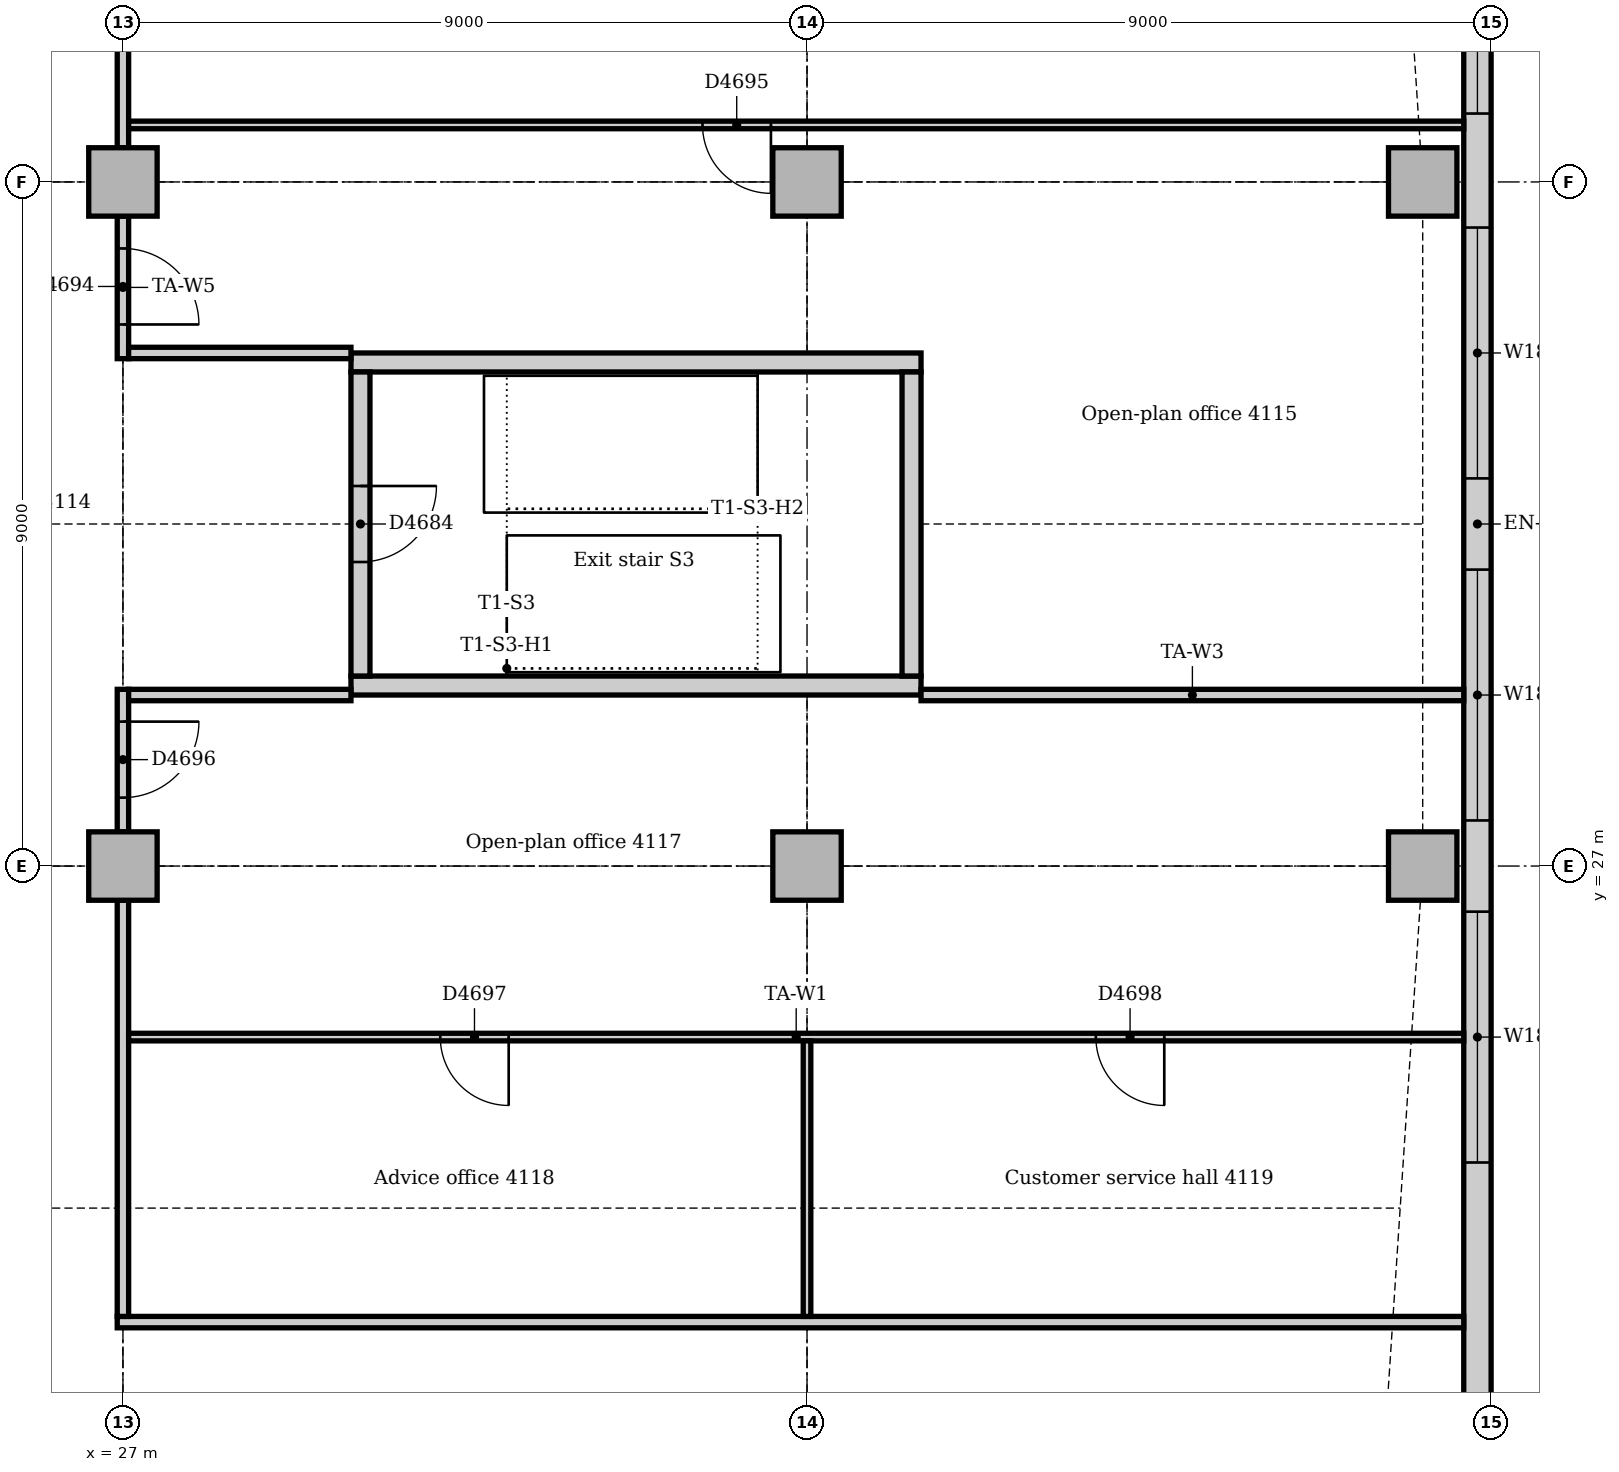
"""IFC4 building model, lengths in metres.
Left out: names, types, materials, properties, quantities, classifications, styles, units other than length and angle.
Written with IfcOpenShell. Run it as: python <this file> out.ifc"""

import sys

from ifc_helpers import new_model, si_unit, direction, frame, frame_2d, origin, origin_2d, place, context, subcontext, project, spatial, rectangle, extrude, element, fill, save


model = new_model("IFC4")
c1 = context("Model", 3, precision=1e-05, world=origin(), true_north=direction((0.0, 1.0)))
c2 = subcontext(c1, "Body", "Model", "MODEL_VIEW")
j1 = project(units=[si_unit("LENGTHUNIT", "METRE"), si_unit("PLANEANGLEUNIT", "RADIAN")], contexts=[c1])
p1 = place(None, origin())
s1 = spatial("IfcSite", under=j1, at=p1, CompositionType="ELEMENT")
p2 = place(p1, origin())
s2 = spatial("IfcBuilding", under=s1, at=p2, CompositionType="ELEMENT")
p3 = place(p2, frame((0.0, 0.0, 173.0)))
s3 = spatial("IfcBuildingStorey", under=s2, at=p3, CompositionType="ELEMENT", Elevation=173.0)
for number, where, z_axis, x_axis in (
    (1, (30.0, 29.375, 0.0), (0.0, 0.0, 1.0), (1.0, 0.0, 0.0)),
    (2, (37.5, 33.625, 0.0), (0.0, 0.0, 1.0), (-1.0, 0.0, 0.0)),
):
    element("IfcWall", number, at=place(p3, frame(where, z_axis=z_axis, x_axis=x_axis)), inside=s3, PredefinedType="SOLIDWALL", context=c2, shape_type="SweptSolid", body=[
        extrude(rectangle(XDim=7.5, YDim=0.25, at=frame_2d((3.75, 0.0))), origin(), (0.0, 0.0, 1.0), 4.0),
    ])
p4 = place(p3, frame((37.375, 29.5, 0.0), z_axis=(0.0, 0.0, 1.0), x_axis=(0.0, 1.0, 0.0)))
e3 = element("IfcWall", 3, at=p4, inside=s3, PredefinedType="SOLIDWALL", context=c2, shape_type="SweptSolid", body=[
    extrude(rectangle(XDim=4.0, YDim=0.25, at=frame_2d((2.0, 0.0))), origin(), (0.0, 0.0, 1.0), 4.0),
])
p5 = place(p3, frame((30.125, 33.5, 0.0), z_axis=(0.0, 0.0, 1.0), x_axis=(0.0, -1.0, 0.0)))
e4 = element("IfcWall", 4, at=p5, inside=s3, PredefinedType="SOLIDWALL", context=c2, shape_type="SweptSolid", body=[
    extrude(rectangle(XDim=4.0, YDim=0.25, at=frame_2d((2.0, 0.0))), origin(), (0.0, 0.0, 1.0), 4.0),
])
p6 = place(p5, frame((1.5, 0.0, 0.0)))
e5 = element("IfcOpeningElement", 5, at=p6, cuts=e4, PredefinedType="OPENING", context=c2, shape_type="SweptSolid", body=[
    extrude(rectangle(XDim=1.0, YDim=2.1, at=frame_2d((0.5, 1.05))), frame((0.0, 0.135, 0.0), z_axis=(0.0, -1.0, 0.0), x_axis=(1.0, 0.0, 0.0)), (0.0, 0.0, 1.0), 0.27),
])
for number, where, z_axis, x_axis in (
    (6, (44.1, 27.0, 0.0), (0.0, 0.0, 1.0), (1.0, 0.0, 0.0)),
    (7, (44.1, 36.0, 0.0), (0.0, 0.0, 1.0), (1.0, 0.0, 0.0)),
    (8, (27.0, 27.0, 0.0), (0.0, 0.0, 1.0), (1.0, 0.0, 0.0)),
    (9, (27.0, 36.0, 0.0), (0.0, 0.0, 1.0), (1.0, 0.0, 0.0)),
    (10, (36.0, 27.0, 0.0), (0.0, 0.0, 1.0), (1.0, 0.0, 0.0)),
    (11, (36.0, 36.0, 0.0), (0.0, 0.0, 1.0), (1.0, 0.0, 0.0)),
):
    element("IfcColumn", number, at=place(p3, frame(where, z_axis=z_axis, x_axis=x_axis)), inside=s3, PredefinedType="COLUMN", context=c2, shape_type="SweptSolid", body=[
        extrude(rectangle(XDim=0.9, YDim=0.9, at=origin_2d()), origin(), (0.0, 0.0, 1.0), 3.85),
    ])
p7 = place(p3, frame((44.82, 19.243, 0.0), z_axis=(0.0, 0.0, 1.0), x_axis=(0.0, 1.0, 0.0)))
e12 = element("IfcWall", 12, at=p7, inside=s3, PredefinedType="STANDARD", context=c2, shape_type="SweptSolid", body=[
    extrude(rectangle(XDim=24.515, YDim=0.36, at=frame_2d((12.257, 0.0))), origin(), (0.0, 0.0, 1.0), 3.85),
])
p8 = place(p7, frame((3.857, 0.0, 0.9)))
e13 = element("IfcOpeningElement", 13, at=p8, cuts=e12, PredefinedType="OPENING", context=c2, shape_type="SweptSolid", body=[
    extrude(rectangle(XDim=3.3, YDim=1.6, at=frame_2d((1.65, 0.8))), frame((0.0, 0.19, 0.0), z_axis=(0.0, -1.0, 0.0), x_axis=(1.0, 0.0, 0.0)), (0.0, 0.0, 1.0), 0.38),
])
p9 = place(p7, frame((8.357, 0.0, 0.9)))
e14 = element("IfcOpeningElement", 14, at=p9, cuts=e12, PredefinedType="OPENING", context=c2, shape_type="SweptSolid", body=[
    extrude(rectangle(XDim=3.3, YDim=1.6, at=frame_2d((1.65, 0.8))), frame((0.0, 0.19, 0.0), z_axis=(0.0, -1.0, 0.0), x_axis=(1.0, 0.0, 0.0)), (0.0, 0.0, 1.0), 0.38),
])
p10 = place(p7, frame((12.857, 0.0, 0.9)))
e15 = element("IfcOpeningElement", 15, at=p10, cuts=e12, PredefinedType="OPENING", context=c2, shape_type="SweptSolid", body=[
    extrude(rectangle(XDim=3.3, YDim=1.6, at=frame_2d((1.65, 0.8))), frame((0.0, 0.19, 0.0), z_axis=(0.0, -1.0, 0.0), x_axis=(1.0, 0.0, 0.0)), (0.0, 0.0, 1.0), 0.38),
])
p11 = place(p7, frame((17.657, 0.0, 0.9)))
e16 = element("IfcOpeningElement", 16, at=p11, cuts=e12, PredefinedType="OPENING", context=c2, shape_type="SweptSolid", body=[
    extrude(rectangle(XDim=3.3, YDim=1.6, at=frame_2d((1.65, 0.8))), frame((0.0, 0.19, 0.0), z_axis=(0.0, -1.0, 0.0), x_axis=(1.0, 0.0, 0.0)), (0.0, 0.0, 1.0), 0.38),
])
p12 = place(p3, frame((26.925, 21.0, 0.0), z_axis=(0.0, 0.0, 1.0), x_axis=(1.0, 0.0, 0.0)))
e17 = element("IfcWall", 17, at=p12, inside=s3, PredefinedType="PARTITIONING", context=c2, shape_type="SweptSolid", body=[
    extrude(rectangle(XDim=17.715, YDim=0.15, at=frame_2d((8.857, 0.0))), origin(), (0.0, 0.0, 1.0), 3.85),
])
p13 = place(p3, frame((27.0, 33.675, 0.0), z_axis=(0.0, 0.0, 1.0), x_axis=(0.0, 1.0, 0.0)))
e18 = element("IfcWall", 18, at=p13, inside=s3, PredefinedType="PARTITIONING", context=c2, shape_type="SweptSolid", body=[
    extrude(rectangle(XDim=1.875, YDim=0.15, at=frame_2d((0.938, 0.0))), origin(), (0.0, 0.0, 1.0), 3.362),
])
p14 = place(p13, frame((0.45, 0.0, 0.0)))
e19 = element("IfcOpeningElement", 19, at=p14, cuts=e18, PredefinedType="OPENING", context=c2, shape_type="SweptSolid", body=[
    extrude(rectangle(XDim=1.0, YDim=2.1, at=frame_2d((0.5, 1.05))), frame((0.0, 0.085, 0.0), z_axis=(0.0, -1.0, 0.0), x_axis=(1.0, 0.0, 0.0)), (0.0, 0.0, 1.0), 0.17),
])
p15 = place(p3, frame((27.0, 36.45, 0.0), z_axis=(0.0, 0.0, 1.0), x_axis=(0.0, 1.0, 0.0)))
e20 = element("IfcWall", 20, at=p15, inside=s3, PredefinedType="PARTITIONING", context=c2, shape_type="SweptSolid", body=[
    extrude(rectangle(XDim=7.2, YDim=0.15, at=frame_2d((3.6, 0.0))), origin(), (0.0, 0.0, 1.0), 3.362),
])
p16 = place(p3, frame((27.0, 21.075, 0.0), z_axis=(0.0, 0.0, 1.0), x_axis=(0.0, 1.0, 0.0)))
e21 = element("IfcWall", 21, at=p16, inside=s3, PredefinedType="PARTITIONING", context=c2, shape_type="SweptSolid", body=[
    extrude(rectangle(XDim=5.475, YDim=0.15, at=frame_2d((2.737, 0.0))), origin(), (0.0, 0.0, 1.0), 3.362),
])
p17 = place(p3, frame((27.0, 27.45, 0.0), z_axis=(0.0, 0.0, 1.0), x_axis=(0.0, 1.0, 0.0)))
e22 = element("IfcWall", 22, at=p17, inside=s3, PredefinedType="PARTITIONING", context=c2, shape_type="SweptSolid", body=[
    extrude(rectangle(XDim=1.875, YDim=0.15, at=frame_2d((0.938, 0.0))), origin(), (0.0, 0.0, 1.0), 3.362),
])
p18 = place(p17, frame((0.45, 0.0, 0.0)))
e23 = element("IfcOpeningElement", 23, at=p18, cuts=e22, PredefinedType="OPENING", context=c2, shape_type="SweptSolid", body=[
    extrude(rectangle(XDim=1.0, YDim=2.1, at=frame_2d((0.5, 1.05))), frame((0.0, 0.085, 0.0), z_axis=(0.0, -1.0, 0.0), x_axis=(1.0, 0.0, 0.0)), (0.0, 0.0, 1.0), 0.17),
])
for number, where, z_axis, x_axis in (
    (24, (27.075, 29.25, 0.0), (0.0, 0.0, 1.0), (1.0, 0.0, 0.0)),
    (25, (27.075, 33.75, 0.0), (0.0, 0.0, 1.0), (1.0, 0.0, 0.0)),
):
    element("IfcWall", number, at=place(p3, frame(where, z_axis=z_axis, x_axis=x_axis)), inside=s3, PredefinedType="PARTITIONING", context=c2, shape_type="SweptSolid", body=[
        extrude(rectangle(XDim=2.925, YDim=0.15, at=frame_2d((1.462, 0.0))), origin(), (0.0, 0.0, 1.0), 3.85),
    ])
p19 = place(p3, frame((37.5, 29.25, 0.0), z_axis=(0.0, 0.0, 1.0), x_axis=(1.0, 0.0, 0.0)))
e26 = element("IfcWall", 26, at=p19, inside=s3, PredefinedType="PARTITIONING", context=c2, shape_type="SweptSolid", body=[
    extrude(rectangle(XDim=7.14, YDim=0.15, at=frame_2d((3.57, 0.0))), origin(), (0.0, 0.0, 1.0), 3.85),
])
p20 = place(p3, frame((27.075, 24.75, 0.0), z_axis=(0.0, 0.0, 1.0), x_axis=(1.0, 0.0, 0.0)))
e27 = element("IfcWall", 27, at=p20, inside=s3, PredefinedType="PARTITIONING", context=c2, shape_type="SweptSolid", body=[
    extrude(rectangle(XDim=17.565, YDim=0.1, at=frame_2d((8.783, 0.0))), origin(), (0.0, 0.0, 1.0), 3.85),
])
p21 = place(p20, frame((4.1, 0.0, 0.0)))
e28 = element("IfcOpeningElement", 28, at=p21, cuts=e27, PredefinedType="OPENING", context=c2, shape_type="SweptSolid", body=[
    extrude(rectangle(XDim=0.9, YDim=2.1, at=frame_2d((0.45, 1.05))), frame((0.0, 0.06, 0.0), z_axis=(0.0, -1.0, 0.0), x_axis=(1.0, 0.0, 0.0)), (0.0, 0.0, 1.0), 0.12),
])
p22 = place(p20, frame((12.725, 0.0, 0.0)))
e29 = element("IfcOpeningElement", 29, at=p22, cuts=e27, PredefinedType="OPENING", context=c2, shape_type="SweptSolid", body=[
    extrude(rectangle(XDim=0.9, YDim=2.1, at=frame_2d((0.45, 1.05))), frame((0.0, 0.06, 0.0), z_axis=(0.0, -1.0, 0.0), x_axis=(1.0, 0.0, 0.0)), (0.0, 0.0, 1.0), 0.12),
])
p23 = place(p3, frame((27.075, 36.75, 0.0), z_axis=(0.0, 0.0, 1.0), x_axis=(1.0, 0.0, 0.0)))
e30 = element("IfcWall", 30, at=p23, inside=s3, PredefinedType="PARTITIONING", context=c2, shape_type="SweptSolid", body=[
    extrude(rectangle(XDim=17.565, YDim=0.1, at=frame_2d((8.783, 0.0))), origin(), (0.0, 0.0, 1.0), 3.85),
])
p24 = place(p23, frame((7.55, 0.0, 0.0)))
e31 = element("IfcOpeningElement", 31, at=p24, cuts=e30, PredefinedType="OPENING", context=c2, shape_type="SweptSolid", body=[
    extrude(rectangle(XDim=0.9, YDim=2.1, at=frame_2d((0.45, 1.05))), frame((0.0, 0.06, 0.0), z_axis=(0.0, -1.0, 0.0), x_axis=(1.0, 0.0, 0.0)), (0.0, 0.0, 1.0), 0.12),
])
p25 = place(p3, frame((36.0, 21.075, 0.0), z_axis=(0.0, 0.0, 1.0), x_axis=(0.0, 1.0, 0.0)))
e32 = element("IfcWall", 32, at=p25, inside=s3, PredefinedType="PARTITIONING", context=c2, shape_type="SweptSolid", body=[
    extrude(rectangle(XDim=3.625, YDim=0.1, at=frame_2d((1.812, 0.0))), origin(), (0.0, 0.0, 1.0), 3.362),
])
p26 = place(p8, origin())
e33 = element("IfcWindow", 33, at=p26, inside=s3, PartitioningType="SINGLE_PANEL", PredefinedType="WINDOW", context=c2, shape_type="SweptSolid", body=[
    extrude(rectangle(XDim=3.3, YDim=1.6, at=frame_2d((1.65, 0.8))), frame((0.0, 0.13, 0.0), z_axis=(0.0, -1.0, 0.0), x_axis=(1.0, 0.0, 0.0)), (0.0, 0.0, 1.0), 0.06),
])
fill(e13, e33)
p27 = place(p9, origin())
e34 = element("IfcWindow", 34, at=p27, inside=s3, PartitioningType="SINGLE_PANEL", PredefinedType="WINDOW", context=c2, shape_type="SweptSolid", body=[
    extrude(rectangle(XDim=3.3, YDim=1.6, at=frame_2d((1.65, 0.8))), frame((0.0, 0.13, 0.0), z_axis=(0.0, -1.0, 0.0), x_axis=(1.0, 0.0, 0.0)), (0.0, 0.0, 1.0), 0.06),
])
fill(e14, e34)
p28 = place(p10, origin())
e35 = element("IfcWindow", 35, at=p28, inside=s3, PartitioningType="SINGLE_PANEL", PredefinedType="WINDOW", context=c2, shape_type="SweptSolid", body=[
    extrude(rectangle(XDim=3.3, YDim=1.6, at=frame_2d((1.65, 0.8))), frame((0.0, 0.13, 0.0), z_axis=(0.0, -1.0, 0.0), x_axis=(1.0, 0.0, 0.0)), (0.0, 0.0, 1.0), 0.06),
])
fill(e15, e35)
p29 = place(p11, origin())
e36 = element("IfcWindow", 36, at=p29, inside=s3, PartitioningType="SINGLE_PANEL", PredefinedType="WINDOW", context=c2, shape_type="SweptSolid", body=[
    extrude(rectangle(XDim=3.3, YDim=1.6, at=frame_2d((1.65, 0.8))), frame((0.0, 0.13, 0.0), z_axis=(0.0, -1.0, 0.0), x_axis=(1.0, 0.0, 0.0)), (0.0, 0.0, 1.0), 0.06),
])
fill(e16, e36)
p30 = place(p6, origin())
e37 = element("IfcDoor", 37, at=p30, inside=s3, OperationType="SINGLE_SWING_LEFT", PredefinedType="DOOR", context=c2, shape_type="SweptSolid", body=[
    extrude(rectangle(XDim=1.0, YDim=2.1, at=frame_2d((0.5, 1.05))), frame((0.0, 0.025, 0.0), z_axis=(0.0, -1.0, 0.0), x_axis=(1.0, 0.0, 0.0)), (0.0, 0.0, 1.0), 0.05),
])
fill(e5, e37)
p31 = place(p14, frame((1.0, 0.0, 0.0), z_axis=(0.0, 0.0, 1.0), x_axis=(-1.0, 0.0, 0.0)))
e38 = element("IfcDoor", 38, at=p31, inside=s3, OperationType="SINGLE_SWING_RIGHT", PredefinedType="DOOR", context=c2, shape_type="SweptSolid", body=[
    extrude(rectangle(XDim=1.0, YDim=2.1, at=frame_2d((0.5, 1.05))), frame((0.0, 0.025, 0.0), z_axis=(0.0, -1.0, 0.0), x_axis=(1.0, 0.0, 0.0)), (0.0, 0.0, 1.0), 0.05),
])
fill(e19, e38)
p32 = place(p24, frame((0.9, 0.0, 0.0), z_axis=(0.0, 0.0, 1.0), x_axis=(-1.0, 0.0, 0.0)))
e39 = element("IfcDoor", 39, at=p32, inside=s3, OperationType="SINGLE_SWING_LEFT", PredefinedType="DOOR", context=c2, shape_type="SweptSolid", body=[
    extrude(rectangle(XDim=0.9, YDim=2.1, at=frame_2d((0.45, 1.05))), frame((0.0, 0.025, 0.0), z_axis=(0.0, -1.0, 0.0), x_axis=(1.0, 0.0, 0.0)), (0.0, 0.0, 1.0), 0.05),
])
fill(e31, e39)
p33 = place(p18, frame((1.0, 0.0, 0.0), z_axis=(0.0, 0.0, 1.0), x_axis=(-1.0, 0.0, 0.0)))
e40 = element("IfcDoor", 40, at=p33, inside=s3, OperationType="SINGLE_SWING_LEFT", PredefinedType="DOOR", context=c2, shape_type="SweptSolid", body=[
    extrude(rectangle(XDim=1.0, YDim=2.1, at=frame_2d((0.5, 1.05))), frame((0.0, 0.025, 0.0), z_axis=(0.0, -1.0, 0.0), x_axis=(1.0, 0.0, 0.0)), (0.0, 0.0, 1.0), 0.05),
])
fill(e23, e40)
p34 = place(p21, frame((0.9, 0.0, 0.0), z_axis=(0.0, 0.0, 1.0), x_axis=(-1.0, 0.0, 0.0)))
e41 = element("IfcDoor", 41, at=p34, inside=s3, OperationType="SINGLE_SWING_LEFT", PredefinedType="DOOR", context=c2, shape_type="SweptSolid", body=[
    extrude(rectangle(XDim=0.9, YDim=2.1, at=frame_2d((0.45, 1.05))), frame((0.0, 0.025, 0.0), z_axis=(0.0, -1.0, 0.0), x_axis=(1.0, 0.0, 0.0)), (0.0, 0.0, 1.0), 0.05),
])
fill(e28, e41)
p35 = place(p22, frame((0.9, 0.0, 0.0), z_axis=(0.0, 0.0, 1.0), x_axis=(-1.0, 0.0, 0.0)))
e42 = element("IfcDoor", 42, at=p35, inside=s3, OperationType="SINGLE_SWING_LEFT", PredefinedType="DOOR", context=c2, shape_type="SweptSolid", body=[
    extrude(rectangle(XDim=0.9, YDim=2.1, at=frame_2d((0.45, 1.05))), frame((0.0, 0.025, 0.0), z_axis=(0.0, -1.0, 0.0), x_axis=(1.0, 0.0, 0.0)), (0.0, 0.0, 1.0), 0.05),
])
fill(e29, e42)
save(model, sys.argv[1])
